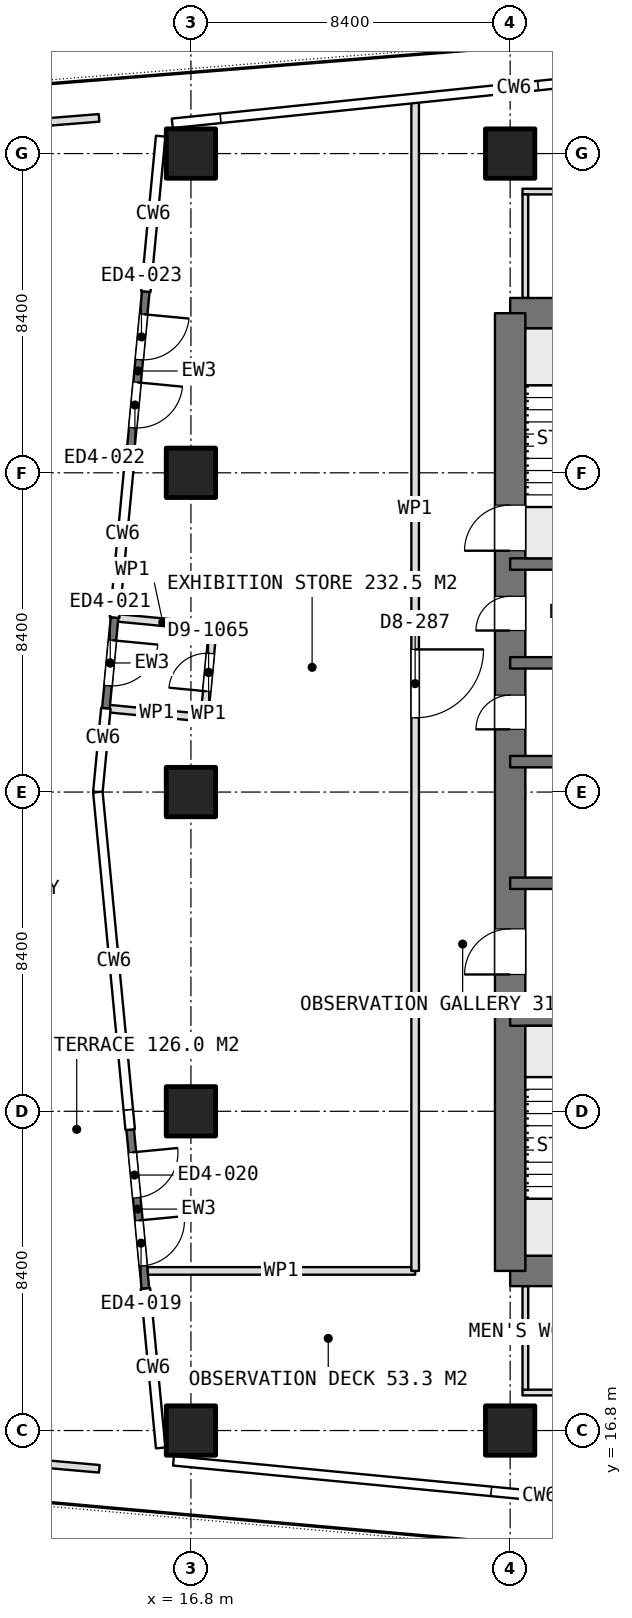
"""IFC4 building model, lengths in metres.
Left out: names, types, materials, properties, quantities, classifications, styles, units other than length and angle.
Written with IfcOpenShell. Run it as: python <this file> out.ifc"""

import sys

from ifc_helpers import new_model, si_unit, direction, frame, frame_2d, origin, origin_2d, place, context, subcontext, project, spatial, rectangle, extrude, element, fill, save


model = new_model("IFC4")
c1 = context("Model", 3, precision=1e-05, world=origin(), true_north=direction((0.0, 1.0)))
c2 = subcontext(c1, "Body", "Model", "MODEL_VIEW")
j1 = project(units=[si_unit("LENGTHUNIT", "METRE"), si_unit("PLANEANGLEUNIT", "RADIAN")], contexts=[c1])
p1 = place(None, origin())
s1 = spatial("IfcSite", under=j1, at=p1, CompositionType="ELEMENT")
p2 = place(p1, origin())
s2 = spatial("IfcBuilding", under=s1, at=p2, CompositionType="ELEMENT")
p3 = place(p2, frame((0.0, 0.0, 291.35)))
s3 = spatial("IfcBuildingStorey", under=s2, at=p3, CompositionType="ELEMENT", Elevation=291.35)
for number, where, z_axis, x_axis in (
    (1, (25.2, 21.0, 0.0), (0.0, 0.0, 1.0), (1.0, 0.0, 0.0)),
    (2, (25.2, 46.2, 0.0), (0.0, 0.0, 1.0), (1.0, 0.0, 0.0)),
):
    element("IfcWall", number, at=place(p3, frame(where, z_axis=z_axis, x_axis=x_axis)), inside=s3, PredefinedType="SHEAR", context=c2, shape_type="SweptSolid", body=[
        extrude(rectangle(XDim=10.4, YDim=0.8, at=frame_2d((5.2, 0.0))), origin(), (0.0, 0.0, 1.0), 5.4),
    ])
p4 = place(p3, frame((25.2, 21.0, 0.0), z_axis=(0.0, 0.0, 1.0), x_axis=(0.0, 1.0, 0.0)))
e3 = element("IfcWall", 3, at=p4, inside=s3, PredefinedType="SHEAR", context=c2, shape_type="SweptSolid", body=[
    extrude(rectangle(XDim=25.2, YDim=0.8, at=frame_2d((12.6, 0.0))), origin(), (0.0, 0.0, 1.0), 5.4),
])
p5 = place(p4, frame((7.8, 0.0, 0.0)))
e4 = element("IfcOpeningElement", 4, at=p5, cuts=e3, PredefinedType="OPENING", context=c2, shape_type="SweptSolid", body=[
    extrude(rectangle(XDim=1.2, YDim=2.1, at=frame_2d((0.6, 1.05))), frame((0.0, 0.41, 0.0), z_axis=(0.0, -1.0, 0.0), x_axis=(1.0, 0.0, 0.0)), (0.0, 0.0, 1.0), 0.82),
])
p6 = place(p4, frame((14.25, 0.0, 0.0)))
e5 = element("IfcOpeningElement", 5, at=p6, cuts=e3, PredefinedType="OPENING", context=c2, shape_type="SweptSolid", body=[
    extrude(rectangle(XDim=0.9, YDim=2.1, at=frame_2d((0.45, 1.05))), frame((0.0, 0.41, 0.0), z_axis=(0.0, -1.0, 0.0), x_axis=(1.0, 0.0, 0.0)), (0.0, 0.0, 1.0), 0.82),
])
p7 = place(p4, frame((16.85, 0.0, 0.0)))
e6 = element("IfcOpeningElement", 6, at=p7, cuts=e3, PredefinedType="OPENING", context=c2, shape_type="SweptSolid", body=[
    extrude(rectangle(XDim=0.9, YDim=2.1, at=frame_2d((0.45, 1.05))), frame((0.0, 0.41, 0.0), z_axis=(0.0, -1.0, 0.0), x_axis=(1.0, 0.0, 0.0)), (0.0, 0.0, 1.0), 0.82),
])
p8 = place(p4, frame((18.95, 0.0, 0.0)))
e7 = element("IfcOpeningElement", 7, at=p8, cuts=e3, PredefinedType="OPENING", context=c2, shape_type="SweptSolid", body=[
    extrude(rectangle(XDim=1.2, YDim=2.1, at=frame_2d((0.6, 1.05))), frame((0.0, 0.41, 0.0), z_axis=(0.0, -1.0, 0.0), x_axis=(1.0, 0.0, 0.0)), (0.0, 0.0, 1.0), 0.82),
])
p9 = place(p3, frame((25.2, 27.6, 0.0), z_axis=(0.0, 0.0, 1.0), x_axis=(1.0, 0.0, 0.0)))
e8 = element("IfcWall", 8, at=p9, inside=s3, PredefinedType="SHEAR", context=c2, shape_type="SweptSolid", body=[
    extrude(rectangle(XDim=6.6, YDim=0.3, at=frame_2d((3.3, 0.0))), origin(), (0.0, 0.0, 1.0), 5.4),
])
p10 = place(p9, frame((5.05, 0.0, 0.0)))
e9 = element("IfcOpeningElement", 9, at=p10, cuts=e8, PredefinedType="OPENING", context=c2, shape_type="SweptSolid", body=[
    extrude(rectangle(XDim=1.2, YDim=2.1, at=frame_2d((0.6, 1.05))), frame((0.0, 0.16, 0.0), z_axis=(0.0, -1.0, 0.0), x_axis=(1.0, 0.0, 0.0)), (0.0, 0.0, 1.0), 0.32),
])
p11 = place(p3, frame((25.2, 31.2, 0.0), z_axis=(0.0, 0.0, 1.0), x_axis=(1.0, 0.0, 0.0)))
e10 = element("IfcWall", 10, at=p11, inside=s3, PredefinedType="SHEAR", context=c2, shape_type="SweptSolid", body=[
    extrude(rectangle(XDim=6.6, YDim=0.3, at=frame_2d((3.3, 0.0))), origin(), (0.0, 0.0, 1.0), 5.4),
])
p12 = place(p11, frame((2.65, 0.0, 0.0)))
e11 = element("IfcOpeningElement", 11, at=p12, cuts=e10, PredefinedType="OPENING", context=c2, shape_type="SweptSolid", body=[
    extrude(rectangle(XDim=1.3, YDim=2.1, at=frame_2d((0.65, 1.05))), frame((0.0, 0.16, 0.0), z_axis=(0.0, -1.0, 0.0), x_axis=(1.0, 0.0, 0.0)), (0.0, 0.0, 1.0), 0.32),
])
for number, where, z_axis, x_axis in (
    (12, (25.2, 34.4, 0.0), (0.0, 0.0, 1.0), (1.0, 0.0, 0.0)),
    (13, (25.2, 37.0, 0.0), (0.0, 0.0, 1.0), (1.0, 0.0, 0.0)),
    (14, (25.2, 39.6, 0.0), (0.0, 0.0, 1.0), (1.0, 0.0, 0.0)),
):
    element("IfcWall", number, at=place(p3, frame(where, z_axis=z_axis, x_axis=x_axis)), inside=s3, PredefinedType="SHEAR", context=c2, shape_type="SweptSolid", body=[
        extrude(rectangle(XDim=6.6, YDim=0.3, at=frame_2d((3.3, 0.0))), origin(), (0.0, 0.0, 1.0), 5.4),
    ])
for number, where, z_axis, x_axis in (
    (15, (16.8, 16.8, 0.0), (0.0, 0.0, 1.0), (1.0, 0.0, 0.0)),
    (16, (16.8, 25.2, 0.0), (0.0, 0.0, 1.0), (1.0, 0.0, 0.0)),
    (17, (16.8, 33.6, 0.0), (0.0, 0.0, 1.0), (1.0, 0.0, 0.0)),
    (18, (16.8, 42.0, 0.0), (0.0, 0.0, 1.0), (1.0, 0.0, 0.0)),
    (19, (16.8, 50.4, 0.0), (0.0, 0.0, 1.0), (1.0, 0.0, 0.0)),
    (20, (25.2, 16.8, 0.0), (0.0, 0.0, 1.0), (1.0, 0.0, 0.0)),
    (21, (25.2, 50.4, 0.0), (0.0, 0.0, 1.0), (1.0, 0.0, 0.0)),
):
    element("IfcColumn", number, at=place(p3, frame(where, z_axis=z_axis, x_axis=x_axis)), inside=s3, PredefinedType="COLUMN", context=c2, shape_type="SweptSolid", body=[
        extrude(rectangle(XDim=1.3, YDim=1.3, at=origin_2d()), origin(), (0.0, 0.0, 1.0), 5.4),
    ])
p13 = place(p3, frame((15.612, 46.77, 0.0), z_axis=(0.0, 0.0, 1.0), x_axis=(-0.095335790659, -0.995445170273, 0.0)))
e22 = element("IfcWall", 22, at=p13, inside=s3, PredefinedType="SOLIDWALL", context=c2, shape_type="SweptSolid", body=[
    extrude(rectangle(XDim=4.2, YDim=0.2, at=frame_2d((2.1, 0.0))), origin(), (0.0, 0.0, 1.0), 5.1),
])
p14 = place(p13, frame((0.6, 0.0, 0.0)))
e23 = element("IfcOpeningElement", 23, at=p14, cuts=e22, PredefinedType="OPENING", context=c2, shape_type="SweptSolid", body=[
    extrude(rectangle(XDim=1.2, YDim=2.4, at=frame_2d((0.6, 1.2))), frame((0.0, 0.11, 0.0), z_axis=(0.0, -1.0, 0.0), x_axis=(1.0, 0.0, 0.0)), (0.0, 0.0, 1.0), 0.22),
])
p15 = place(p13, frame((2.4, 0.0, 0.0)))
e24 = element("IfcOpeningElement", 24, at=p15, cuts=e22, PredefinedType="OPENING", context=c2, shape_type="SweptSolid", body=[
    extrude(rectangle(XDim=1.2, YDim=2.4, at=frame_2d((0.6, 1.2))), frame((0.0, 0.11, 0.0), z_axis=(0.0, -1.0, 0.0), x_axis=(1.0, 0.0, 0.0)), (0.0, 0.0, 1.0), 0.22),
])
p16 = place(p3, frame((14.791, 38.191, 0.0), z_axis=(0.0, 0.0, 1.0), x_axis=(-0.095313116599, -0.995447341553, 0.0)))
e25 = element("IfcWall", 25, at=p16, inside=s3, PredefinedType="SOLIDWALL", context=c2, shape_type="SweptSolid", body=[
    extrude(rectangle(XDim=2.4, YDim=0.2, at=frame_2d((1.2, 0.0))), origin(), (0.0, 0.0, 1.0), 5.1),
])
p17 = place(p16, frame((0.6, 0.0, 0.0)))
e26 = element("IfcOpeningElement", 26, at=p17, cuts=e25, PredefinedType="OPENING", context=c2, shape_type="SweptSolid", body=[
    extrude(rectangle(XDim=1.2, YDim=2.4, at=frame_2d((0.6, 1.2))), frame((0.0, 0.11, 0.0), z_axis=(0.0, -1.0, 0.0), x_axis=(1.0, 0.0, 0.0)), (0.0, 0.0, 1.0), 0.22),
])
p18 = place(p3, frame((15.202, 24.717, 0.0), z_axis=(0.0, 0.0, 1.0), x_axis=(0.0953302742, -0.99544569858, 0.0)))
e27 = element("IfcWall", 27, at=p18, inside=s3, PredefinedType="SOLIDWALL", context=c2, shape_type="SweptSolid", body=[
    extrude(rectangle(XDim=4.2, YDim=0.2, at=frame_2d((2.1, 0.0))), origin(), (0.0, 0.0, 1.0), 5.1),
])
p19 = place(p18, frame((0.6, 0.0, 0.0)))
e28 = element("IfcOpeningElement", 28, at=p19, cuts=e27, PredefinedType="OPENING", context=c2, shape_type="SweptSolid", body=[
    extrude(rectangle(XDim=1.2, YDim=2.4, at=frame_2d((0.6, 1.2))), frame((0.0, 0.11, 0.0), z_axis=(0.0, -1.0, 0.0), x_axis=(1.0, 0.0, 0.0)), (0.0, 0.0, 1.0), 0.22),
])
p20 = place(p18, frame((2.4, 0.0, 0.0)))
e29 = element("IfcOpeningElement", 29, at=p20, cuts=e27, PredefinedType="OPENING", context=c2, shape_type="SweptSolid", body=[
    extrude(rectangle(XDim=1.2, YDim=2.4, at=frame_2d((0.6, 1.2))), frame((0.0, 0.11, 0.0), z_axis=(0.0, -1.0, 0.0), x_axis=(1.0, 0.0, 0.0)), (0.0, 0.0, 1.0), 0.22),
])
p21 = place(p3, frame((14.382, 51.339, 0.0), z_axis=(0.0, 0.0, 1.0), x_axis=(-0.996836484012, -0.079479709002, 0.0)))
e30 = element("IfcWall", 30, at=p21, inside=s3, PredefinedType="USERDEFINED", context=c2, shape_type="SweptSolid", body=[
    extrude(rectangle(XDim=6.432, YDim=0.2, at=frame_2d((3.216, 0.0))), origin(), (0.0, 0.0, 1.0), 0.6),
])
p22 = place(p3, frame((7.914, 16.369, 0.0), z_axis=(0.0, 0.0, 1.0), x_axis=(0.996073744761, -0.088527368643, 0.0)))
e31 = element("IfcWall", 31, at=p22, inside=s3, PredefinedType="USERDEFINED", context=c2, shape_type="SweptSolid", body=[
    extrude(rectangle(XDim=6.5, YDim=0.2, at=frame_2d((3.25, 0.0))), origin(), (0.0, 0.0, 1.0), 0.6),
])
p23 = place(p3, frame((25.525, 49.4, 0.0), z_axis=(0.0, 0.0, 1.0), x_axis=(1.0, 0.0, 0.0)))
e32 = element("IfcWall", 32, at=p23, inside=s3, PredefinedType="PARTITIONING", context=c2, shape_type="SweptSolid", body=[
    extrude(rectangle(XDim=9.75, YDim=0.15, at=frame_2d((4.875, 0.0))), origin(), (0.0, 0.0, 1.0), 5.1),
])
p24 = place(p23, frame((4.375, 0.0, 0.0)))
e33 = element("IfcOpeningElement", 33, at=p24, cuts=e32, PredefinedType="OPENING", context=c2, shape_type="SweptSolid", body=[
    extrude(rectangle(XDim=1.0, YDim=2.1, at=frame_2d((0.5, 1.05))), frame((0.0, 0.085, 0.0), z_axis=(0.0, -1.0, 0.0), x_axis=(1.0, 0.0, 0.0)), (0.0, 0.0, 1.0), 0.17),
])
p25 = place(p3, frame((25.6, 46.6, 0.0), z_axis=(0.0, 0.0, 1.0), x_axis=(0.0, 1.0, 0.0)))
e34 = element("IfcWall", 34, at=p25, inside=s3, PredefinedType="PARTITIONING", context=c2, shape_type="SweptSolid", body=[
    extrude(rectangle(XDim=2.725, YDim=0.15, at=frame_2d((1.362, 0.0))), origin(), (0.0, 0.0, 1.0), 5.1),
])
p26 = place(p3, frame((25.525, 17.8, 0.0), z_axis=(0.0, 0.0, 1.0), x_axis=(1.0, 0.0, 0.0)))
e35 = element("IfcWall", 35, at=p26, inside=s3, PredefinedType="PARTITIONING", context=c2, shape_type="SweptSolid", body=[
    extrude(rectangle(XDim=9.75, YDim=0.15, at=frame_2d((4.875, 0.0))), origin(), (0.0, 0.0, 1.0), 5.1),
])
p27 = place(p26, frame((4.375, 0.0, 0.0)))
e36 = element("IfcOpeningElement", 36, at=p27, cuts=e35, PredefinedType="OPENING", context=c2, shape_type="SweptSolid", body=[
    extrude(rectangle(XDim=1.0, YDim=2.1, at=frame_2d((0.5, 1.05))), frame((0.0, 0.085, 0.0), z_axis=(0.0, -1.0, 0.0), x_axis=(1.0, 0.0, 0.0)), (0.0, 0.0, 1.0), 0.17),
])
p28 = place(p3, frame((25.6, 17.875, 0.0), z_axis=(0.0, 0.0, 1.0), x_axis=(0.0, 1.0, 0.0)))
e37 = element("IfcWall", 37, at=p28, inside=s3, PredefinedType="PARTITIONING", context=c2, shape_type="SweptSolid", body=[
    extrude(rectangle(XDim=2.725, YDim=0.15, at=frame_2d((1.363, 0.0))), origin(), (0.0, 0.0, 1.0), 5.1),
])
p29 = place(p3, frame((14.661, 35.793, 0.0), z_axis=(0.0, 0.0, 1.0), x_axis=(0.995421006925, -0.095587755349, 0.0)))
e38 = element("IfcWall", 38, at=p29, inside=s3, PredefinedType="PARTITIONING", context=c2, shape_type="SweptSolid", body=[
    extrude(rectangle(XDim=2.5, YDim=0.2, at=frame_2d((1.25, 0.0))), origin(), (0.0, 0.0, 1.0), 5.1),
])
p30 = place(p3, frame((17.15, 35.554, 0.0), z_axis=(0.0, 0.0, 1.0), x_axis=(0.095413912609, 0.995437685282, 0.0)))
e39 = element("IfcWall", 39, at=p30, inside=s3, PredefinedType="PARTITIONING", context=c2, shape_type="SweptSolid", body=[
    extrude(rectangle(XDim=2.4, YDim=0.2, at=frame_2d((1.2, 0.0))), origin(), (0.0, 0.0, 1.0), 5.1),
])
p31 = place(p30, frame((0.7, 0.0, 0.0)))
e40 = element("IfcOpeningElement", 40, at=p31, cuts=e39, PredefinedType="OPENING", context=c2, shape_type="SweptSolid", body=[
    extrude(rectangle(XDim=1.0, YDim=2.1, at=frame_2d((0.5, 1.05))), frame((0.0, 0.11, 0.0), z_axis=(0.0, -1.0, 0.0), x_axis=(1.0, 0.0, 0.0)), (0.0, 0.0, 1.0), 0.22),
])
p32 = place(p3, frame((17.379, 37.943, 0.0), z_axis=(0.0, 0.0, 1.0), x_axis=(-0.9954348182, 0.095443819681, 0.0)))
e41 = element("IfcWall", 41, at=p32, inside=s3, PredefinedType="PARTITIONING", context=c2, shape_type="SweptSolid", body=[
    extrude(rectangle(XDim=2.65, YDim=0.2, at=frame_2d((1.325, 0.0))), origin(), (0.0, 0.0, 1.0), 5.1),
])
p33 = place(p3, frame((22.7, 51.835, 0.0), z_axis=(0.0, 0.0, 1.0), x_axis=(0.0, -1.0, 0.0)))
e42 = element("IfcWall", 42, at=p33, inside=s3, PredefinedType="PARTITIONING", context=c2, shape_type="SweptSolid", body=[
    extrude(rectangle(XDim=30.835, YDim=0.2, at=frame_2d((15.417, 0.0))), origin(), (0.0, 0.0, 1.0), 5.1),
])
p34 = place(p33, frame((14.482, 0.0, 0.0)))
e43 = element("IfcOpeningElement", 43, at=p34, cuts=e42, PredefinedType="OPENING", context=c2, shape_type="SweptSolid", body=[
    extrude(rectangle(XDim=1.8, YDim=2.1, at=frame_2d((0.9, 1.05))), frame((0.0, 0.11, 0.0), z_axis=(0.0, -1.0, 0.0), x_axis=(1.0, 0.0, 0.0)), (0.0, 0.0, 1.0), 0.22),
])
p35 = place(p3, frame((22.7, 21.0, 0.0), z_axis=(0.0, 0.0, 1.0), x_axis=(-1.0, 0.0, 0.0)))
e44 = element("IfcWall", 44, at=p35, inside=s3, PredefinedType="PARTITIONING", context=c2, shape_type="SweptSolid", body=[
    extrude(rectangle(XDim=7.042, YDim=0.2, at=frame_2d((3.521, 0.0))), origin(), (0.0, 0.0, 1.0), 5.1),
])
p36 = place(p14, origin())
e45 = element("IfcDoor", 45, at=p36, inside=s3, OperationType="SINGLE_SWING_LEFT", PredefinedType="DOOR", context=c2, shape_type="SweptSolid", body=[
    extrude(rectangle(XDim=1.2, YDim=2.4, at=frame_2d((0.6, 1.2))), frame((0.0, 0.025, 0.0), z_axis=(0.0, -1.0, 0.0), x_axis=(1.0, 0.0, 0.0)), (0.0, 0.0, 1.0), 0.05),
])
fill(e23, e45)
p37 = place(p15, origin())
e46 = element("IfcDoor", 46, at=p37, inside=s3, OperationType="SINGLE_SWING_LEFT", PredefinedType="DOOR", context=c2, shape_type="SweptSolid", body=[
    extrude(rectangle(XDim=1.2, YDim=2.4, at=frame_2d((0.6, 1.2))), frame((0.0, 0.025, 0.0), z_axis=(0.0, -1.0, 0.0), x_axis=(1.0, 0.0, 0.0)), (0.0, 0.0, 1.0), 0.05),
])
fill(e24, e46)
p38 = place(p17, origin())
e47 = element("IfcDoor", 47, at=p38, inside=s3, OperationType="SINGLE_SWING_LEFT", PredefinedType="DOOR", context=c2, shape_type="SweptSolid", body=[
    extrude(rectangle(XDim=1.2, YDim=2.4, at=frame_2d((0.6, 1.2))), frame((0.0, 0.025, 0.0), z_axis=(0.0, -1.0, 0.0), x_axis=(1.0, 0.0, 0.0)), (0.0, 0.0, 1.0), 0.05),
])
fill(e26, e47)
p39 = place(p19, origin())
e48 = element("IfcDoor", 48, at=p39, inside=s3, OperationType="SINGLE_SWING_LEFT", PredefinedType="DOOR", context=c2, shape_type="SweptSolid", body=[
    extrude(rectangle(XDim=1.2, YDim=2.4, at=frame_2d((0.6, 1.2))), frame((0.0, 0.025, 0.0), z_axis=(0.0, -1.0, 0.0), x_axis=(1.0, 0.0, 0.0)), (0.0, 0.0, 1.0), 0.05),
])
fill(e28, e48)
p40 = place(p20, origin())
e49 = element("IfcDoor", 49, at=p40, inside=s3, OperationType="SINGLE_SWING_LEFT", PredefinedType="DOOR", context=c2, shape_type="SweptSolid", body=[
    extrude(rectangle(XDim=1.2, YDim=2.4, at=frame_2d((0.6, 1.2))), frame((0.0, 0.025, 0.0), z_axis=(0.0, -1.0, 0.0), x_axis=(1.0, 0.0, 0.0)), (0.0, 0.0, 1.0), 0.05),
])
fill(e29, e49)
p41 = place(p5, origin())
e50 = element("IfcDoor", 50, at=p41, inside=s3, OperationType="SINGLE_SWING_LEFT", PredefinedType="DOOR", context=c2, shape_type="SweptSolid", body=[
    extrude(rectangle(XDim=1.2, YDim=2.1, at=frame_2d((0.6, 1.05))), frame((0.0, 0.025, 0.0), z_axis=(0.0, -1.0, 0.0), x_axis=(1.0, 0.0, 0.0)), (0.0, 0.0, 1.0), 0.05),
])
fill(e4, e50)
p42 = place(p6, origin())
e51 = element("IfcDoor", 51, at=p42, inside=s3, OperationType="SINGLE_SWING_LEFT", PredefinedType="DOOR", context=c2, shape_type="SweptSolid", body=[
    extrude(rectangle(XDim=0.9, YDim=2.1, at=frame_2d((0.45, 1.05))), frame((0.0, 0.025, 0.0), z_axis=(0.0, -1.0, 0.0), x_axis=(1.0, 0.0, 0.0)), (0.0, 0.0, 1.0), 0.05),
])
fill(e5, e51)
p43 = place(p7, origin())
e52 = element("IfcDoor", 52, at=p43, inside=s3, OperationType="SINGLE_SWING_LEFT", PredefinedType="DOOR", context=c2, shape_type="SweptSolid", body=[
    extrude(rectangle(XDim=0.9, YDim=2.1, at=frame_2d((0.45, 1.05))), frame((0.0, 0.025, 0.0), z_axis=(0.0, -1.0, 0.0), x_axis=(1.0, 0.0, 0.0)), (0.0, 0.0, 1.0), 0.05),
])
fill(e6, e52)
p44 = place(p34, origin())
e53 = element("IfcDoor", 53, at=p44, inside=s3, OperationType="DOUBLE_DOOR_SINGLE_SWING", PredefinedType="DOOR", context=c2, shape_type="SweptSolid", body=[
    extrude(rectangle(XDim=1.8, YDim=2.1, at=frame_2d((0.9, 1.05))), frame((0.0, 0.025, 0.0), z_axis=(0.0, -1.0, 0.0), x_axis=(1.0, 0.0, 0.0)), (0.0, 0.0, 1.0), 0.05),
])
fill(e43, e53)
p45 = place(p31, origin())
e54 = element("IfcDoor", 54, at=p45, inside=s3, OperationType="SINGLE_SWING_LEFT", PredefinedType="DOOR", context=c2, shape_type="SweptSolid", body=[
    extrude(rectangle(XDim=1.0, YDim=2.1, at=frame_2d((0.5, 1.05))), frame((0.0, 0.025, 0.0), z_axis=(0.0, -1.0, 0.0), x_axis=(1.0, 0.0, 0.0)), (0.0, 0.0, 1.0), 0.05),
])
fill(e40, e54)
p46 = place(p8, origin())
e55 = element("IfcDoor", 55, at=p46, inside=s3, OperationType="SINGLE_SWING_RIGHT", PredefinedType="DOOR", context=c2, shape_type="SweptSolid", body=[
    extrude(rectangle(XDim=1.2, YDim=2.1, at=frame_2d((0.6, 1.05))), frame((0.0, 0.025, 0.0), z_axis=(0.0, -1.0, 0.0), x_axis=(1.0, 0.0, 0.0)), (0.0, 0.0, 1.0), 0.05),
])
fill(e7, e55)
save(model, sys.argv[1])
